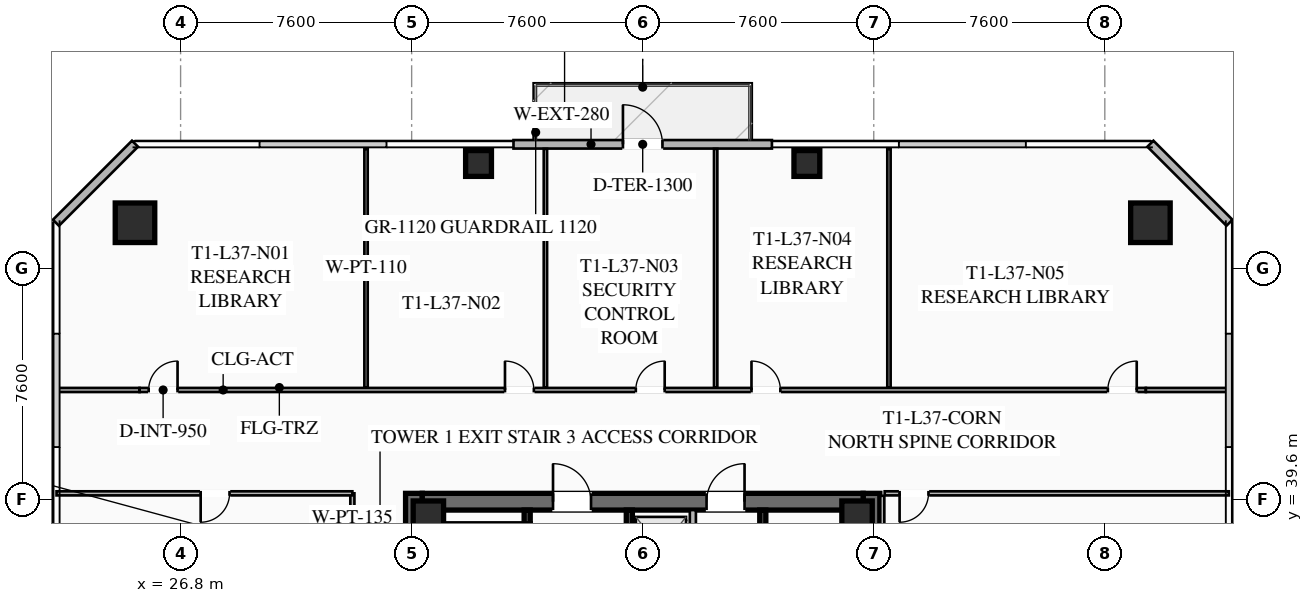
"""IFC4 building model, lengths in metres.
Left out: names, types, materials, properties, quantities, classifications, styles, units other than length and angle.
Written with IfcOpenShell. Run it as: python <this file> out.ifc"""

import sys

from ifc_helpers import new_model, si_unit, direction, frame, frame_2d, origin, origin_2d, place, context, subcontext, project, spatial, rectangle, hollow_rectangle, extrude, element, fill, save


model = new_model("IFC4")
c1 = context("Model", 3, precision=1e-05, world=origin(), true_north=direction((0.0, 1.0)))
c2 = subcontext(c1, "Body", "Model", "MODEL_VIEW")
j1 = project(units=[si_unit("LENGTHUNIT", "METRE"), si_unit("PLANEANGLEUNIT", "RADIAN")], contexts=[c1])
p1 = place(None, origin())
s1 = spatial("IfcSite", under=j1, at=p1, CompositionType="ELEMENT")
p2 = place(p1, origin())
s2 = spatial("IfcBuilding", under=s1, at=p2, CompositionType="ELEMENT")
p3 = place(p2, frame((0.0, 0.0, 139.25)))
s3 = spatial("IfcBuildingStorey", under=s2, at=p3, CompositionType="ELEMENT", Elevation=139.25)
for number, where, z_axis, x_axis in (
    (1, (34.475, 24.2, 0.0), (0.0, 0.0, 1.0), (0.0, 1.0, 0.0)),
    (2, (49.525, 39.8, 0.0), (0.0, 0.0, 1.0), (0.0, -1.0, 0.0)),
):
    element("IfcWall", number, at=place(p3, frame(where, z_axis=z_axis, x_axis=x_axis)), inside=s3, PredefinedType="SHEAR", context=c2, shape_type="SweptSolid", body=[
        extrude(rectangle(XDim=15.6, YDim=0.55, at=frame_2d((7.8, 0.0))), origin(), (0.0, 0.0, 1.0), 3.55),
    ])
p4 = place(p3, frame((34.75, 39.525, 0.0), z_axis=(0.0, 0.0, 1.0), x_axis=(1.0, 0.0, 0.0)))
e3 = element("IfcWall", 3, at=p4, inside=s3, PredefinedType="SHEAR", context=c2, shape_type="SweptSolid", body=[
    extrude(rectangle(XDim=14.5, YDim=0.55, at=frame_2d((7.25, 0.0))), origin(), (0.0, 0.0, 1.0), 3.55),
])
p5 = place(p4, frame((4.3, 0.0, 0.0)))
e4 = element("IfcOpeningElement", 4, at=p5, cuts=e3, PredefinedType="OPENING", context=c2, shape_type="SweptSolid", body=[
    extrude(rectangle(XDim=1.25, YDim=2.25, at=frame_2d((0.625, 1.125))), frame((0.0, 0.285, 0.0), z_axis=(0.0, -1.0, 0.0), x_axis=(1.0, 0.0, 0.0)), (0.0, 0.0, 1.0), 0.57),
])
p6 = place(p4, frame((9.35, 0.0, 0.0)))
e5 = element("IfcOpeningElement", 5, at=p6, cuts=e3, PredefinedType="OPENING", context=c2, shape_type="SweptSolid", body=[
    extrude(rectangle(XDim=1.25, YDim=2.25, at=frame_2d((0.625, 1.125))), frame((0.0, 0.285, 0.0), z_axis=(0.0, -1.0, 0.0), x_axis=(1.0, 0.0, 0.0)), (0.0, 0.0, 1.0), 0.57),
])
for number, where, z_axis, x_axis in (
    (6, (49.05, 39.05, 0.0), (0.0, 0.0, 1.0), (1.0, 0.0, 0.0)),
    (7, (34.95, 39.05, 0.0), (0.0, 0.0, 1.0), (1.0, 0.0, 0.0)),
):
    element("IfcColumn", number, at=place(p3, frame(where, z_axis=z_axis, x_axis=x_axis)), inside=s3, PredefinedType="COLUMN", context=c2, shape_type="SweptSolid", body=[
        extrude(hollow_rectangle(XDim=1.0, YDim=1.0, WallThickness=0.04, at=origin_2d()), origin(), (0.0, 0.0, 1.0), 3.37),
    ])
for number, where, z_axis, x_axis in (
    (8, (58.7, 48.7, 0.0), (0.0, 0.0, 1.0), (1.0, 0.0, 0.0)),
    (9, (25.3, 48.7, 0.0), (0.0, 0.0, 1.0), (1.0, 0.0, 0.0)),
):
    element("IfcColumn", number, at=place(p3, frame(where, z_axis=z_axis, x_axis=x_axis)), inside=s3, PredefinedType="COLUMN", context=c2, shape_type="SweptSolid", body=[
        extrude(hollow_rectangle(XDim=1.3, YDim=1.3, WallThickness=0.05, at=origin_2d()), origin(), (0.0, 0.0, 1.0), 3.37),
    ])
for number, where, z_axis, x_axis in (
    (10, (47.4, 50.65, 0.0), (0.0, 0.0, 1.0), (1.0, 0.0, 0.0)),
    (11, (36.6, 50.65, 0.0), (0.0, 0.0, 1.0), (1.0, 0.0, 0.0)),
):
    element("IfcColumn", number, at=place(p3, frame(where, z_axis=z_axis, x_axis=x_axis)), inside=s3, PredefinedType="COLUMN", context=c2, shape_type="SweptSolid", body=[
        extrude(hollow_rectangle(XDim=0.85, YDim=0.85, WallThickness=0.035, at=origin_2d()), origin(), (0.0, 0.0, 1.0), 3.37),
    ])
p7 = place(p3, frame((37.75, 51.28, 0.0), z_axis=(0.0, 0.0, 1.0), x_axis=(1.0, 0.0, 0.0)))
e12 = element("IfcWall", 12, at=p7, inside=s3, PredefinedType="SOLIDWALL", context=c2, shape_type="SweptSolid", body=[
    extrude(rectangle(XDim=8.5, YDim=0.28, at=frame_2d((4.25, 0.0))), origin(), (0.0, 0.0, 1.0), 3.37),
])
p8 = place(p7, frame((3.6, 0.0, 0.0)))
e13 = element("IfcOpeningElement", 13, at=p8, cuts=e12, PredefinedType="OPENING", context=c2, shape_type="SweptSolid", body=[
    extrude(rectangle(XDim=1.3, YDim=2.15, at=frame_2d((0.65, 1.075))), frame((0.0, 0.15, 0.0), z_axis=(0.0, -1.0, 0.0), x_axis=(1.0, 0.0, 0.0)), (0.0, 0.0, 1.0), 0.3),
])
for number, where, z_axis, x_axis in (
    (14, (22.7, 48.7, 0.0), (0.0, 0.0, 1.0), (0.707, 0.707, 0.0)),
    (15, (58.7, 51.3, 0.0), (0.0, 0.0, 1.0), (0.707, -0.707, 0.0)),
):
    element("IfcWall", number, at=place(p3, frame(where, z_axis=z_axis, x_axis=x_axis)), inside=s3, PredefinedType="SOLIDWALL", context=c2, shape_type="SweptSolid", body=[
        extrude(rectangle(XDim=3.677, YDim=0.28, at=frame_2d((1.838, 0.0))), origin(), (0.0, 0.0, 1.0), 3.37),
    ])
p9 = place(p3, frame((38.2, 31.2, 0.0), z_axis=(0.0, 0.0, 1.0), x_axis=(0.0, 1.0, 0.0)))
e16 = element("IfcWall", 16, at=p9, inside=s3, PredefinedType="SHEAR", context=c2, shape_type="SweptSolid", body=[
    extrude(rectangle(XDim=8.05, YDim=0.2, at=frame_2d((4.025, 0.0))), origin(), (0.0, 0.0, 1.0), 3.37),
])
p10 = place(p9, frame((0.45, 0.0, 0.0)))
e17 = element("IfcOpeningElement", 17, at=p10, cuts=e16, PredefinedType="OPENING", context=c2, shape_type="SweptSolid", body=[
    extrude(rectangle(XDim=1.15, YDim=2.2, at=frame_2d((0.575, 1.1))), frame((0.0, 0.11, 0.0), z_axis=(0.0, -1.0, 0.0), x_axis=(1.0, 0.0, 0.0)), (0.0, 0.0, 1.0), 0.22),
])
p11 = place(p3, frame((41.56, 24.75, 0.0), z_axis=(0.0, 0.0, 1.0), x_axis=(0.0, 1.0, 0.0)))
e18 = element("IfcWall", 18, at=p11, inside=s3, PredefinedType="SHEAR", context=c2, shape_type="SweptSolid", body=[
    extrude(rectangle(XDim=14.5, YDim=0.2, at=frame_2d((7.25, 0.0))), origin(), (0.0, 0.0, 1.0), 3.37),
])
p12 = place(p3, frame((45.95, 39.25, 0.0), z_axis=(0.0, 0.0, 1.0), x_axis=(0.0, -1.0, 0.0)))
e19 = element("IfcWall", 19, at=p12, inside=s3, PredefinedType="SHEAR", context=c2, shape_type="SweptSolid", body=[
    extrude(rectangle(XDim=6.45, YDim=0.2, at=frame_2d((3.225, 0.0))), origin(), (0.0, 0.0, 1.0), 3.37),
])
p13 = place(p3, frame((43.65, 32.35, 0.0), z_axis=(0.0, 0.0, 1.0), x_axis=(0.0, 1.0, 0.0)))
e20 = element("IfcWall", 20, at=p13, inside=s3, PredefinedType="SOLIDWALL", context=c2, shape_type="SweptSolid", body=[
    extrude(rectangle(XDim=6.9, YDim=0.2, at=frame_2d((3.45, 0.0))), origin(), (0.0, 0.0, 1.0), 3.37),
])
p14 = place(p13, frame((0.575, 0.0, 0.0)))
e21 = element("IfcOpeningElement", 21, at=p14, cuts=e20, PredefinedType="OPENING", context=c2, shape_type="SweptSolid", body=[
    extrude(rectangle(XDim=1.1, YDim=2.2, at=frame_2d((0.55, 1.1))), frame((0.0, 0.11, 0.0), z_axis=(0.0, -1.0, 0.0), x_axis=(1.0, 0.0, 0.0)), (0.0, 0.0, 1.0), 0.22),
])
p15 = place(p13, frame((2.825, 0.0, 0.0)))
e22 = element("IfcOpeningElement", 22, at=p15, cuts=e20, PredefinedType="OPENING", context=c2, shape_type="SweptSolid", body=[
    extrude(rectangle(XDim=1.1, YDim=2.2, at=frame_2d((0.55, 1.1))), frame((0.0, 0.11, 0.0), z_axis=(0.0, -1.0, 0.0), x_axis=(1.0, 0.0, 0.0)), (0.0, 0.0, 1.0), 0.22),
])
p16 = place(p13, frame((5.075, 0.0, 0.0)))
e23 = element("IfcOpeningElement", 23, at=p16, cuts=e20, PredefinedType="OPENING", context=c2, shape_type="SweptSolid", body=[
    extrude(rectangle(XDim=1.1, YDim=2.2, at=frame_2d((0.55, 1.1))), frame((0.0, 0.11, 0.0), z_axis=(0.0, -1.0, 0.0), x_axis=(1.0, 0.0, 0.0)), (0.0, 0.0, 1.0), 0.22),
])
p17 = place(p3, frame((32.45, 35.4, 0.0), z_axis=(0.0, 0.0, 1.0), x_axis=(0.0, 1.0, 0.0)))
e24 = element("IfcWall", 24, at=p17, inside=s3, PredefinedType="PARTITIONING", context=c2, shape_type="SweptSolid", body=[
    extrude(rectangle(XDim=4.4, YDim=0.135, at=frame_2d((2.2, 0.0))), origin(), (0.0, 0.0, 1.0), 2.723),
])
p18 = place(p3, frame((25.45, 43.2, 0.0), z_axis=(0.0, 0.0, 1.0), x_axis=(1.0, 0.0, 0.0)))
e25 = element("IfcWall", 25, at=p18, inside=s3, PredefinedType="PARTITIONING", context=c2, shape_type="SweptSolid", body=[
    extrude(rectangle(XDim=33.1, YDim=0.135, at=frame_2d((16.55, 0.0))), origin(), (0.0, 0.0, 1.0), 2.723),
])
p19 = place(p18, frame((0.3, 0.0, 0.0)))
e26 = element("IfcOpeningElement", 26, at=p19, cuts=e25, PredefinedType="OPENING", context=c2, shape_type="SweptSolid", body=[
    extrude(rectangle(XDim=0.95, YDim=2.05, at=frame_2d((0.475, 1.025))), frame((0.0, 0.077, 0.0), z_axis=(0.0, -1.0, 0.0), x_axis=(1.0, 0.0, 0.0)), (0.0, 0.0, 1.0), 0.155),
])
p20 = place(p18, frame((12.02, 0.0, 0.0)))
e27 = element("IfcOpeningElement", 27, at=p20, cuts=e25, PredefinedType="OPENING", context=c2, shape_type="SweptSolid", body=[
    extrude(rectangle(XDim=0.95, YDim=2.05, at=frame_2d((0.475, 1.025))), frame((0.0, 0.077, 0.0), z_axis=(0.0, -1.0, 0.0), x_axis=(1.0, 0.0, 0.0)), (0.0, 0.0, 1.0), 0.155),
])
p21 = place(p18, frame((16.323, 0.0, 0.0)))
e28 = element("IfcOpeningElement", 28, at=p21, cuts=e25, PredefinedType="OPENING", context=c2, shape_type="SweptSolid", body=[
    extrude(rectangle(XDim=0.95, YDim=2.05, at=frame_2d((0.475, 1.025))), frame((0.0, 0.077, 0.0), z_axis=(0.0, -1.0, 0.0), x_axis=(1.0, 0.0, 0.0)), (0.0, 0.0, 1.0), 0.155),
])
p22 = place(p18, frame((20.128, 0.0, 0.0)))
e29 = element("IfcOpeningElement", 29, at=p22, cuts=e25, PredefinedType="OPENING", context=c2, shape_type="SweptSolid", body=[
    extrude(rectangle(XDim=0.95, YDim=2.05, at=frame_2d((0.475, 1.025))), frame((0.0, 0.077, 0.0), z_axis=(0.0, -1.0, 0.0), x_axis=(1.0, 0.0, 0.0)), (0.0, 0.0, 1.0), 0.155),
])
p23 = place(p18, frame((31.85, 0.0, 0.0)))
e30 = element("IfcOpeningElement", 30, at=p23, cuts=e25, PredefinedType="OPENING", context=c2, shape_type="SweptSolid", body=[
    extrude(rectangle(XDim=0.95, YDim=2.05, at=frame_2d((0.475, 1.025))), frame((0.0, 0.077, 0.0), z_axis=(0.0, -1.0, 0.0), x_axis=(1.0, 0.0, 0.0)), (0.0, 0.0, 1.0), 0.155),
])
for number, where, z_axis, x_axis in (
    (31, (22.72, 43.2, 0.0), (0.0, 0.0, 1.0), (1.0, 0.0, 0.0)),
    (32, (58.55, 43.2, 0.0), (0.0, 0.0, 1.0), (1.0, 0.0, 0.0)),
):
    element("IfcWall", number, at=place(p3, frame(where, z_axis=z_axis, x_axis=x_axis)), inside=s3, PredefinedType="PARTITIONING", context=c2, shape_type="SweptSolid", body=[
        extrude(rectangle(XDim=2.73, YDim=0.135, at=frame_2d((1.365, 0.0))), origin(), (0.0, 0.0, 1.0), 2.723),
    ])
for number, where, z_axis, x_axis in (
    (33, (32.9, 43.28, 0.0), (0.0, 0.0, 1.0), (0.0, 1.0, 0.0)),
    (34, (38.8, 43.28, 0.0), (0.0, 0.0, 1.0), (0.0, 1.0, 0.0)),
    (35, (44.4, 43.28, 0.0), (0.0, 0.0, 1.0), (0.0, 1.0, 0.0)),
    (36, (50.1, 43.28, 0.0), (0.0, 0.0, 1.0), (0.0, 1.0, 0.0)),
):
    element("IfcWall", number, at=place(p3, frame(where, z_axis=z_axis, x_axis=x_axis)), inside=s3, PredefinedType="PARTITIONING", context=c2, shape_type="SweptSolid", body=[
        extrude(rectangle(XDim=7.85, YDim=0.11, at=frame_2d((3.925, 0.0))), origin(), (0.0, 0.0, 1.0), 2.723),
    ])
p24 = place(p3, frame((49.88, 39.72, 0.0), z_axis=(0.0, 0.0, 1.0), x_axis=(0.0, -1.0, 0.0)))
e37 = element("IfcWall", 37, at=p24, inside=s3, PredefinedType="PARTITIONING", context=c2, shape_type="SweptSolid", body=[
    extrude(rectangle(XDim=15.44, YDim=0.135, at=frame_2d((7.72, 0.0))), origin(), (0.0, 0.0, 1.0), 2.723),
])
p25 = place(p3, frame((61.28, 39.8, 0.0), z_axis=(0.0, 0.0, 1.0), x_axis=(-1.0, 0.0, 0.0)))
e38 = element("IfcWall", 38, at=p25, inside=s3, PredefinedType="PARTITIONING", context=c2, shape_type="SweptSolid", body=[
    extrude(rectangle(XDim=11.32, YDim=0.135, at=frame_2d((5.66, 0.0))), origin(), (0.0, 0.0, 1.0), 2.723),
])
p26 = place(p25, frame((9.88, 0.0, 0.0)))
e39 = element("IfcOpeningElement", 39, at=p26, cuts=e38, PredefinedType="OPENING", context=c2, shape_type="SweptSolid", body=[
    extrude(rectangle(XDim=0.95, YDim=2.05, at=frame_2d((0.475, 1.025))), frame((0.0, 0.077, 0.0), z_axis=(0.0, -1.0, 0.0), x_axis=(1.0, 0.0, 0.0)), (0.0, 0.0, 1.0), 0.155),
])
p27 = place(p3, frame((32.45, 39.8, 0.0), z_axis=(0.0, 0.0, 1.0), x_axis=(-1.0, 0.0, 0.0)))
e40 = element("IfcWall", 40, at=p27, inside=s3, PredefinedType="PARTITIONING", context=c2, shape_type="SweptSolid", body=[
    extrude(rectangle(XDim=9.73, YDim=0.135, at=frame_2d((4.865, 0.0))), origin(), (0.0, 0.0, 1.0), 2.723),
])
p28 = place(p27, frame((4.04, 0.0, 0.0)))
e41 = element("IfcOpeningElement", 41, at=p28, cuts=e40, PredefinedType="OPENING", context=c2, shape_type="SweptSolid", body=[
    extrude(rectangle(XDim=0.95, YDim=2.05, at=frame_2d((0.475, 1.025))), frame((0.0, 0.077, 0.0), z_axis=(0.0, -1.0, 0.0), x_axis=(1.0, 0.0, 0.0)), (0.0, 0.0, 1.0), 0.155),
])
p29 = place(p8, origin())
e42 = element("IfcDoor", 42, at=p29, inside=s3, OperationType="SINGLE_SWING_LEFT", PredefinedType="DOOR", context=c2, shape_type="SweptSolid", body=[
    extrude(rectangle(XDim=1.3, YDim=2.15, at=frame_2d((0.65, 1.075))), frame((0.0, 0.025, 0.0), z_axis=(0.0, -1.0, 0.0), x_axis=(1.0, 0.0, 0.0)), (0.0, 0.0, 1.0), 0.05),
])
fill(e13, e42)
p30 = place(p5, origin())
e43 = element("IfcDoor", 43, at=p30, inside=s3, OperationType="SINGLE_SWING_LEFT", PredefinedType="DOOR", context=c2, shape_type="SweptSolid", body=[
    extrude(rectangle(XDim=1.25, YDim=2.25, at=frame_2d((0.625, 1.125))), frame((0.0, 0.025, 0.0), z_axis=(0.0, -1.0, 0.0), x_axis=(1.0, 0.0, 0.0)), (0.0, 0.0, 1.0), 0.05),
])
fill(e4, e43)
p31 = place(p6, origin())
e44 = element("IfcDoor", 44, at=p31, inside=s3, OperationType="SINGLE_SWING_RIGHT", PredefinedType="DOOR", context=c2, shape_type="SweptSolid", body=[
    extrude(rectangle(XDim=1.25, YDim=2.25, at=frame_2d((0.625, 1.125))), frame((0.0, 0.025, 0.0), z_axis=(0.0, -1.0, 0.0), x_axis=(1.0, 0.0, 0.0)), (0.0, 0.0, 1.0), 0.05),
])
fill(e5, e44)
p32 = place(p19, origin())
e45 = element("IfcDoor", 45, at=p32, inside=s3, OperationType="SINGLE_SWING_RIGHT", PredefinedType="DOOR", context=c2, shape_type="SweptSolid", body=[
    extrude(rectangle(XDim=0.95, YDim=2.05, at=frame_2d((0.475, 1.025))), frame((0.0, 0.025, 0.0), z_axis=(0.0, -1.0, 0.0), x_axis=(1.0, 0.0, 0.0)), (0.0, 0.0, 1.0), 0.05),
])
fill(e26, e45)
p33 = place(p20, origin())
e46 = element("IfcDoor", 46, at=p33, inside=s3, OperationType="SINGLE_SWING_LEFT", PredefinedType="DOOR", context=c2, shape_type="SweptSolid", body=[
    extrude(rectangle(XDim=0.95, YDim=2.05, at=frame_2d((0.475, 1.025))), frame((0.0, 0.025, 0.0), z_axis=(0.0, -1.0, 0.0), x_axis=(1.0, 0.0, 0.0)), (0.0, 0.0, 1.0), 0.05),
])
fill(e27, e46)
p34 = place(p21, origin())
e47 = element("IfcDoor", 47, at=p34, inside=s3, OperationType="SINGLE_SWING_RIGHT", PredefinedType="DOOR", context=c2, shape_type="SweptSolid", body=[
    extrude(rectangle(XDim=0.95, YDim=2.05, at=frame_2d((0.475, 1.025))), frame((0.0, 0.025, 0.0), z_axis=(0.0, -1.0, 0.0), x_axis=(1.0, 0.0, 0.0)), (0.0, 0.0, 1.0), 0.05),
])
fill(e28, e47)
p35 = place(p22, origin())
e48 = element("IfcDoor", 48, at=p35, inside=s3, OperationType="SINGLE_SWING_LEFT", PredefinedType="DOOR", context=c2, shape_type="SweptSolid", body=[
    extrude(rectangle(XDim=0.95, YDim=2.05, at=frame_2d((0.475, 1.025))), frame((0.0, 0.025, 0.0), z_axis=(0.0, -1.0, 0.0), x_axis=(1.0, 0.0, 0.0)), (0.0, 0.0, 1.0), 0.05),
])
fill(e29, e48)
p36 = place(p23, origin())
e49 = element("IfcDoor", 49, at=p36, inside=s3, OperationType="SINGLE_SWING_RIGHT", PredefinedType="DOOR", context=c2, shape_type="SweptSolid", body=[
    extrude(rectangle(XDim=0.95, YDim=2.05, at=frame_2d((0.475, 1.025))), frame((0.0, 0.025, 0.0), z_axis=(0.0, -1.0, 0.0), x_axis=(1.0, 0.0, 0.0)), (0.0, 0.0, 1.0), 0.05),
])
fill(e30, e49)
p37 = place(p26, origin())
e50 = element("IfcDoor", 50, at=p37, inside=s3, OperationType="SINGLE_SWING_RIGHT", PredefinedType="DOOR", context=c2, shape_type="SweptSolid", body=[
    extrude(rectangle(XDim=0.95, YDim=2.05, at=frame_2d((0.475, 1.025))), frame((0.0, 0.025, 0.0), z_axis=(0.0, -1.0, 0.0), x_axis=(1.0, 0.0, 0.0)), (0.0, 0.0, 1.0), 0.05),
])
fill(e39, e50)
p38 = place(p28, origin())
e51 = element("IfcDoor", 51, at=p38, inside=s3, OperationType="SINGLE_SWING_RIGHT", PredefinedType="DOOR", context=c2, shape_type="SweptSolid", body=[
    extrude(rectangle(XDim=0.95, YDim=2.05, at=frame_2d((0.475, 1.025))), frame((0.0, 0.025, 0.0), z_axis=(0.0, -1.0, 0.0), x_axis=(1.0, 0.0, 0.0)), (0.0, 0.0, 1.0), 0.05),
])
fill(e41, e51)
save(model, sys.argv[1])
